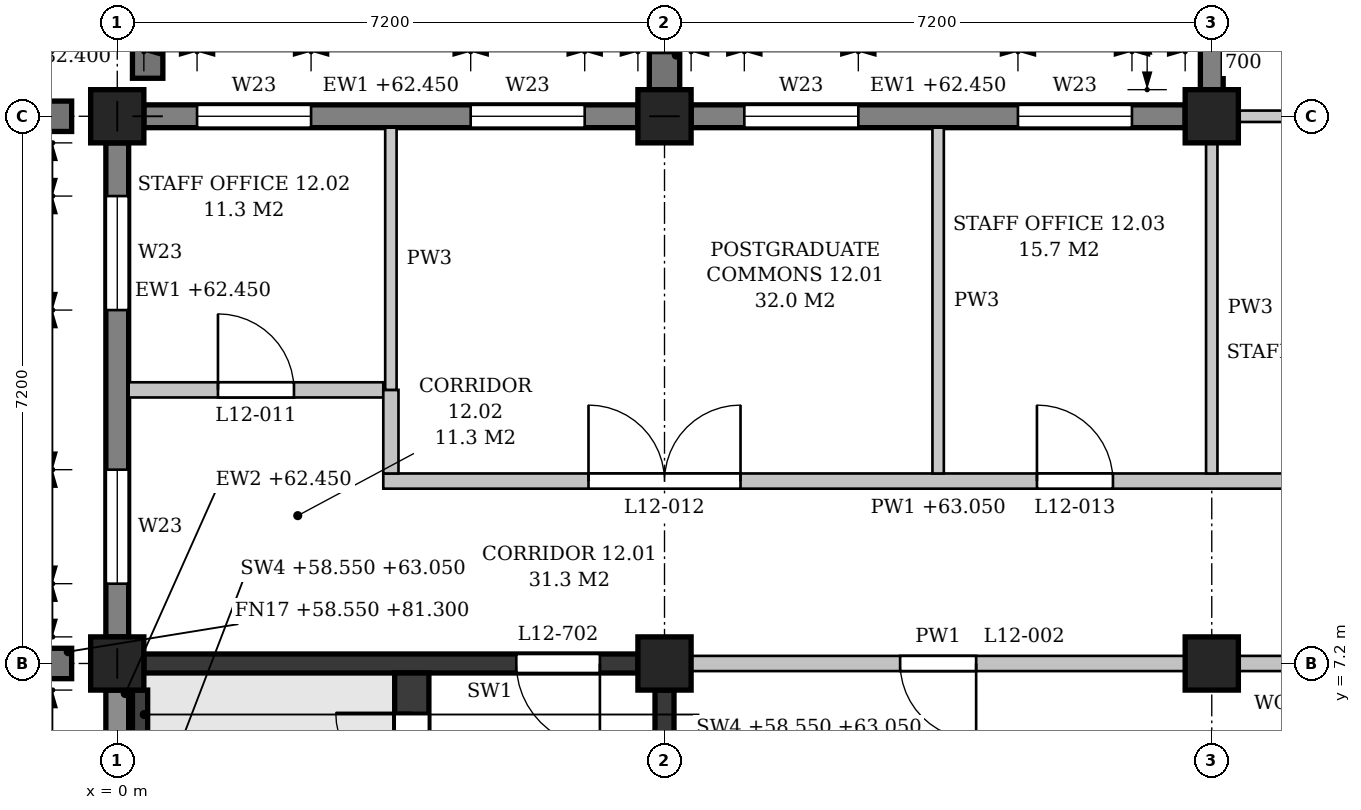
"""IFC4 building model, lengths in metres.
Left out: names, types, materials, properties, quantities, classifications, styles, units other than length and angle.
Written with IfcOpenShell. Run it as: python <this file> out.ifc"""

import sys

from ifc_helpers import new_model, si_unit, direction, frame, frame_2d, origin, origin_2d, place, context, subcontext, project, spatial, polyline, rectangle, outline, extrude, element, fill, save


model = new_model("IFC4")
c1 = context("Model", 3, precision=1e-05, world=origin(), true_north=direction((0.0, 1.0)))
c2 = subcontext(c1, "Body", "Model", "MODEL_VIEW")
j1 = project(units=[si_unit("LENGTHUNIT", "METRE"), si_unit("PLANEANGLEUNIT", "RADIAN")], contexts=[c1])
p1 = place(None, origin())
s1 = spatial("IfcSite", under=j1, at=p1, CompositionType="ELEMENT")
p2 = place(p1, origin())
s2 = spatial("IfcBuilding", under=s1, at=p2, CompositionType="ELEMENT")
p3 = place(p2, frame((0.0, 0.0, 58.8)))
s3 = spatial("IfcBuildingStorey", under=s2, at=p3, CompositionType="ELEMENT", Elevation=58.8)
for number, where, z_axis, x_axis in (
    (1, (0.0, 7.2, 0.0), (0.0, 0.0, 1.0), (1.0, 0.0, 0.0)),
    (2, (0.0, 14.4, 0.0), (0.0, 0.0, 1.0), (1.0, 0.0, 0.0)),
    (3, (7.2, 7.2, 0.0), (0.0, 0.0, 1.0), (1.0, 0.0, 0.0)),
    (4, (7.2, 14.4, 0.0), (0.0, 0.0, 1.0), (1.0, 0.0, 0.0)),
    (5, (14.4, 7.2, 0.0), (0.0, 0.0, 1.0), (1.0, 0.0, 0.0)),
    (6, (14.4, 14.4, 0.0), (0.0, 0.0, 1.0), (1.0, 0.0, 0.0)),
):
    element("IfcColumn", number, at=place(p3, frame(where, z_axis=z_axis, x_axis=x_axis)), inside=s3, PredefinedType="COLUMN", context=c2, shape_type="SweptSolid", body=[
        extrude(rectangle(XDim=0.7, YDim=0.7, at=origin_2d()), origin(), (0.0, 0.0, 1.0), 4.5),
    ])
p4 = place(p3, frame((0.0, 0.35, 0.0), z_axis=(0.0, 0.0, 1.0), x_axis=(0.0, 1.0, 0.0)))
e7 = element("IfcWall", 7, at=p4, inside=s3, PredefinedType="STANDARD", context=c2, shape_type="SweptSolid", body=[
    extrude(rectangle(XDim=6.5, YDim=0.3, at=frame_2d((3.25, 0.0))), origin(), (0.0, 0.0, 1.0), 3.65),
])
p5 = place(p4, frame((1.0, 0.0, 0.9)))
e8 = element("IfcOpeningElement", 8, at=p5, cuts=e7, PredefinedType="OPENING", context=c2, shape_type="SweptSolid", body=[
    extrude(outline(polyline([(0.0, 0.0), (0.9, 0.0), (0.9, 2.25), (0.45, 2.7), (0.0, 2.25), (0.0, 0.0)])), frame((0.0, 0.16, 0.0), z_axis=(0.0, -1.0, 0.0), x_axis=(1.0, 0.0, 0.0)), (0.0, 0.0, 1.0), 0.32),
])
p6 = place(p4, frame((4.6, 0.0, 0.9)))
e9 = element("IfcOpeningElement", 9, at=p6, cuts=e7, PredefinedType="OPENING", context=c2, shape_type="SweptSolid", body=[
    extrude(outline(polyline([(0.0, 0.0), (0.9, 0.0), (0.9, 2.25), (0.45, 2.7), (0.0, 2.25), (0.0, 0.0)])), frame((0.0, 0.16, 0.0), z_axis=(0.0, -1.0, 0.0), x_axis=(1.0, 0.0, 0.0)), (0.0, 0.0, 1.0), 0.32),
])
p7 = place(p3, frame((0.0, 7.55, 0.0), z_axis=(0.0, 0.0, 1.0), x_axis=(0.0, 1.0, 0.0)))
e10 = element("IfcWall", 10, at=p7, inside=s3, PredefinedType="STANDARD", context=c2, shape_type="SweptSolid", body=[
    extrude(rectangle(XDim=6.5, YDim=0.3, at=frame_2d((3.25, 0.0))), origin(), (0.0, 0.0, 1.0), 3.65),
])
p8 = place(p7, frame((0.7, 0.0, 0.9)))
e11 = element("IfcOpeningElement", 11, at=p8, cuts=e10, PredefinedType="OPENING", context=c2, shape_type="SweptSolid", body=[
    extrude(outline(polyline([(0.0, 0.0), (1.5, 0.0), (1.5, 1.95), (0.75, 2.7), (0.0, 1.95), (0.0, 0.0)])), frame((0.0, 0.16, 0.0), z_axis=(0.0, -1.0, 0.0), x_axis=(1.0, 0.0, 0.0)), (0.0, 0.0, 1.0), 0.32),
])
p9 = place(p7, frame((4.3, 0.0, 0.9)))
e12 = element("IfcOpeningElement", 12, at=p9, cuts=e10, PredefinedType="OPENING", context=c2, shape_type="SweptSolid", body=[
    extrude(outline(polyline([(0.0, 0.0), (1.5, 0.0), (1.5, 1.95), (0.75, 2.7), (0.0, 1.95), (0.0, 0.0)])), frame((0.0, 0.16, 0.0), z_axis=(0.0, -1.0, 0.0), x_axis=(1.0, 0.0, 0.0)), (0.0, 0.0, 1.0), 0.32),
])
p10 = place(p3, frame((14.05, 14.4, 0.0), z_axis=(0.0, 0.0, 1.0), x_axis=(-1.0, 0.0, 0.0)))
e13 = element("IfcWall", 13, at=p10, inside=s3, PredefinedType="STANDARD", context=c2, shape_type="SweptSolid", body=[
    extrude(rectangle(XDim=6.5, YDim=0.3, at=frame_2d((3.25, 0.0))), origin(), (0.0, 0.0, 1.0), 3.65),
])
p11 = place(p10, frame((0.7, 0.0, 0.9)))
e14 = element("IfcOpeningElement", 14, at=p11, cuts=e13, PredefinedType="OPENING", context=c2, shape_type="SweptSolid", body=[
    extrude(outline(polyline([(0.0, 0.0), (1.5, 0.0), (1.5, 1.95), (0.75, 2.7), (0.0, 1.95), (0.0, 0.0)])), frame((0.0, 0.16, 0.0), z_axis=(0.0, -1.0, 0.0), x_axis=(1.0, 0.0, 0.0)), (0.0, 0.0, 1.0), 0.32),
])
p12 = place(p10, frame((4.3, 0.0, 0.9)))
e15 = element("IfcOpeningElement", 15, at=p12, cuts=e13, PredefinedType="OPENING", context=c2, shape_type="SweptSolid", body=[
    extrude(outline(polyline([(0.0, 0.0), (1.5, 0.0), (1.5, 1.95), (0.75, 2.7), (0.0, 1.95), (0.0, 0.0)])), frame((0.0, 0.16, 0.0), z_axis=(0.0, -1.0, 0.0), x_axis=(1.0, 0.0, 0.0)), (0.0, 0.0, 1.0), 0.32),
])
p13 = place(p3, frame((6.85, 14.4, 0.0), z_axis=(0.0, 0.0, 1.0), x_axis=(-1.0, 0.0, 0.0)))
e16 = element("IfcWall", 16, at=p13, inside=s3, PredefinedType="STANDARD", context=c2, shape_type="SweptSolid", body=[
    extrude(rectangle(XDim=6.5, YDim=0.3, at=frame_2d((3.25, 0.0))), origin(), (0.0, 0.0, 1.0), 3.65),
])
p14 = place(p13, frame((0.7, 0.0, 0.9)))
e17 = element("IfcOpeningElement", 17, at=p14, cuts=e16, PredefinedType="OPENING", context=c2, shape_type="SweptSolid", body=[
    extrude(outline(polyline([(0.0, 0.0), (1.5, 0.0), (1.5, 1.95), (0.75, 2.7), (0.0, 1.95), (0.0, 0.0)])), frame((0.0, 0.16, 0.0), z_axis=(0.0, -1.0, 0.0), x_axis=(1.0, 0.0, 0.0)), (0.0, 0.0, 1.0), 0.32),
])
p15 = place(p13, frame((4.3, 0.0, 0.9)))
e18 = element("IfcOpeningElement", 18, at=p15, cuts=e16, PredefinedType="OPENING", context=c2, shape_type="SweptSolid", body=[
    extrude(outline(polyline([(0.0, 0.0), (1.5, 0.0), (1.5, 1.95), (0.75, 2.7), (0.0, 1.95), (0.0, 0.0)])), frame((0.0, 0.16, 0.0), z_axis=(0.0, -1.0, 0.0), x_axis=(1.0, 0.0, 0.0)), (0.0, 0.0, 1.0), 0.32),
])
p16 = place(p3, frame((14.4, 14.75, 0.0), z_axis=(0.0, 0.0, 1.0), x_axis=(0.0, 1.0, 0.0)))
e19 = element("IfcWall", 19, at=p16, inside=s3, PredefinedType="STANDARD", context=c2, shape_type="SweptSolid", body=[
    extrude(rectangle(XDim=6.5, YDim=0.3, at=frame_2d((3.25, 0.0))), origin(), (0.0, 0.0, 1.0), 3.65),
])
p17 = place(p16, frame((0.7, 0.0, 0.9)))
e20 = element("IfcOpeningElement", 20, at=p17, cuts=e19, PredefinedType="OPENING", context=c2, shape_type="SweptSolid", body=[
    extrude(outline(polyline([(0.0, 0.0), (1.5, 0.0), (1.5, 1.95), (0.75, 2.7), (0.0, 1.95), (0.0, 0.0)])), frame((0.0, 0.16, 0.0), z_axis=(0.0, -1.0, 0.0), x_axis=(1.0, 0.0, 0.0)), (0.0, 0.0, 1.0), 0.32),
])
p18 = place(p16, frame((4.3, 0.0, 0.9)))
e21 = element("IfcOpeningElement", 21, at=p18, cuts=e19, PredefinedType="OPENING", context=c2, shape_type="SweptSolid", body=[
    extrude(outline(polyline([(0.0, 0.0), (1.5, 0.0), (1.5, 1.95), (0.75, 2.7), (0.0, 1.95), (0.0, 0.0)])), frame((0.0, 0.16, 0.0), z_axis=(0.0, -1.0, 0.0), x_axis=(1.0, 0.0, 0.0)), (0.0, 0.0, 1.0), 0.32),
])
p19 = place(p3, frame((-0.6, 7.2, -0.25), z_axis=(0.0, 0.0, 1.0), x_axis=(-1.0, 0.0, 0.0)))
e22 = element("IfcWall", 22, at=p19, inside=s3, PredefinedType="POLYGONAL", context=c2, shape_type="SweptSolid", body=[
    extrude(outline(polyline([(0.5, 0.0), (0.5, 22.225), (0.15, 22.75), (0.0, 22.75), (0.0, 0.0), (0.5, 0.0)])), frame((0.0, 0.2, 0.0), z_axis=(0.0, -1.0, 0.0), x_axis=(1.0, 0.0, 0.0)), (0.0, 0.0, 1.0), 0.4),
])
for number, where, z_axis, x_axis in (
    (23, (-0.6, 14.4, -0.25), (0.0, 0.0, 1.0), (-1.0, 0.0, 0.0)),
    (24, (0.4, 14.9, -0.25), (0.0, 0.0, 1.0), (0.0, 1.0, 0.0)),
):
    element("IfcWall", number, at=place(p3, frame(where, z_axis=z_axis, x_axis=x_axis)), inside=s3, PredefinedType="POLYGONAL", context=c2, shape_type="SweptSolid", body=[
        extrude(outline(polyline([(0.5, 0.0), (0.5, 23.85), (0.0, 23.85), (0.0, 0.0), (0.5, 0.0)])), frame((0.0, 0.2, 0.0), z_axis=(0.0, -1.0, 0.0), x_axis=(1.0, 0.0, 0.0)), (0.0, 0.0, 1.0), 0.4),
    ])
p20 = place(p3, frame((7.2, 14.75, -0.25), z_axis=(0.0, 0.0, 1.0), x_axis=(0.0, 1.0, 0.0)))
e25 = element("IfcWall", 25, at=p20, inside=s3, PredefinedType="POLYGONAL", context=c2, shape_type="SweptSolid", body=[
    extrude(outline(polyline([(0.5, 0.0), (0.5, 22.225), (0.15, 22.75), (0.0, 22.75), (0.0, 0.0), (0.5, 0.0)])), frame((0.0, 0.2, 0.0), z_axis=(0.0, -1.0, 0.0), x_axis=(1.0, 0.0, 0.0)), (0.0, 0.0, 1.0), 0.4),
])
p21 = place(p3, frame((0.35, 7.2, 0.0), z_axis=(0.0, 0.0, 1.0), x_axis=(1.0, 0.0, 0.0)))
e26 = element("IfcWall", 26, at=p21, inside=s3, PredefinedType="SHEAR", context=c2, shape_type="SweptSolid", body=[
    extrude(rectangle(XDim=6.5, YDim=0.25, at=frame_2d((3.25, 0.0))), origin(), (0.0, 0.0, 1.0), 3.6),
])
p22 = place(p21, frame((4.9, 0.0, 0.0)))
e27 = element("IfcOpeningElement", 27, at=p22, cuts=e26, PredefinedType="OPENING", context=c2, shape_type="SweptSolid", body=[
    extrude(rectangle(XDim=1.1, YDim=2.1, at=frame_2d((0.55, 1.05))), frame((0.0, 0.135, 0.0), z_axis=(0.0, -1.0, 0.0), x_axis=(1.0, 0.0, 0.0)), (0.0, 0.0, 1.0), 0.27),
])
p23 = place(p3, frame((7.2, 0.35, 0.0), z_axis=(0.0, 0.0, 1.0), x_axis=(0.0, 1.0, 0.0)))
e28 = element("IfcWall", 28, at=p23, inside=s3, PredefinedType="SHEAR", context=c2, shape_type="SweptSolid", body=[
    extrude(rectangle(XDim=6.5, YDim=0.25, at=frame_2d((3.25, 0.0))), origin(), (0.0, 0.0, 1.0), 3.6),
])
p24 = place(p3, frame((0.3, 5.85, -0.25), z_axis=(0.0, 0.0, 1.0), x_axis=(0.0, 1.0, 0.0)))
e29 = element("IfcWall", 29, at=p24, inside=s3, PredefinedType="SHEAR", context=c2, shape_type="SweptSolid", body=[
    extrude(rectangle(XDim=1.0, YDim=0.2, at=frame_2d((0.5, 0.0))), origin(), (0.0, 0.0, 1.0), 4.5),
])
p25 = place(p3, frame((3.875, 0.15, 0.0), z_axis=(0.0, 0.0, 1.0), x_axis=(0.0, 1.0, 0.0)))
e30 = element("IfcWall", 30, at=p25, inside=s3, PredefinedType="SHEAR", context=c2, shape_type="SweptSolid", body=[
    extrude(rectangle(XDim=6.925, YDim=0.45, at=frame_2d((3.462, 0.0))), origin(), (0.0, 0.0, 1.0), 4.25),
])
p26 = place(p25, frame((5.4, 0.0, 0.0)))
e31 = element("IfcOpeningElement", 31, at=p26, cuts=e30, PredefinedType="OPENING", context=c2, shape_type="SweptSolid", body=[
    extrude(rectangle(XDim=1.0, YDim=2.1, at=frame_2d((0.5, 1.05))), frame((0.0, 0.235, 0.0), z_axis=(0.0, -1.0, 0.0), x_axis=(1.0, 0.0, 0.0)), (0.0, 0.0, 1.0), 0.47),
])
p27 = place(p3, frame((7.55, 7.2, 0.0), z_axis=(0.0, 0.0, 1.0), x_axis=(1.0, 0.0, 0.0)))
e32 = element("IfcWall", 32, at=p27, inside=s3, PredefinedType="PARTITIONING", context=c2, shape_type="SweptSolid", body=[
    extrude(rectangle(XDim=6.5, YDim=0.2, at=frame_2d((3.25, 0.0))), origin(), (0.0, 0.0, 1.0), 3.6),
])
p28 = place(p27, frame((2.75, 0.0, 0.0)))
e33 = element("IfcOpeningElement", 33, at=p28, cuts=e32, PredefinedType="OPENING", context=c2, shape_type="SweptSolid", body=[
    extrude(rectangle(XDim=1.0, YDim=2.1, at=frame_2d((0.5, 1.05))), frame((0.0, 0.11, 0.0), z_axis=(0.0, -1.0, 0.0), x_axis=(1.0, 0.0, 0.0)), (0.0, 0.0, 1.0), 0.22),
])
p29 = place(p3, frame((14.75, 7.2, 0.0), z_axis=(0.0, 0.0, 1.0), x_axis=(1.0, 0.0, 0.0)))
e34 = element("IfcWall", 34, at=p29, inside=s3, PredefinedType="PARTITIONING", context=c2, shape_type="SweptSolid", body=[
    extrude(rectangle(XDim=6.5, YDim=0.2, at=frame_2d((3.25, 0.0))), origin(), (0.0, 0.0, 1.0), 3.6),
])
p30 = place(p29, frame((4.375, 0.0, 0.0)))
e35 = element("IfcOpeningElement", 35, at=p30, cuts=e34, PredefinedType="OPENING", context=c2, shape_type="SweptSolid", body=[
    extrude(rectangle(XDim=1.0, YDim=2.1, at=frame_2d((0.5, 1.05))), frame((0.0, 0.11, 0.0), z_axis=(0.0, -1.0, 0.0), x_axis=(1.0, 0.0, 0.0)), (0.0, 0.0, 1.0), 0.22),
])
p31 = place(p3, frame((3.5, 9.6, 0.0), z_axis=(0.0, 0.0, 1.0), x_axis=(1.0, 0.0, 0.0)))
e36 = element("IfcWall", 36, at=p31, inside=s3, PredefinedType="PARTITIONING", context=c2, shape_type="SweptSolid", body=[
    extrude(outline(polyline([(0.0, 0.0), (14.6, 0.0), (14.6, 4.25), (11.1, 4.25), (11.1, 3.6), (10.7, 3.6), (10.7, 4.25), (3.9, 4.25), (3.9, 3.6), (3.5, 3.6), (3.5, 4.25), (0.0, 4.25), (0.0, 0.0)])), frame((0.0, 0.1, 0.0), z_axis=(0.0, -1.0, 0.0), x_axis=(1.0, 0.0, 0.0)), (0.0, 0.0, 1.0), 0.2),
])
p32 = place(p31, frame((2.7, 0.0, 0.0)))
e37 = element("IfcOpeningElement", 37, at=p32, cuts=e36, PredefinedType="OPENING", context=c2, shape_type="SweptSolid", body=[
    extrude(rectangle(XDim=2.0, YDim=2.1, at=frame_2d((1.0, 1.05))), frame((0.0, 0.11, 0.0), z_axis=(0.0, -1.0, 0.0), x_axis=(1.0, 0.0, 0.0)), (0.0, 0.0, 1.0), 0.22),
])
p33 = place(p31, frame((8.6, 0.0, 0.0)))
e38 = element("IfcOpeningElement", 38, at=p33, cuts=e36, PredefinedType="OPENING", context=c2, shape_type="SweptSolid", body=[
    extrude(rectangle(XDim=1.0, YDim=2.1, at=frame_2d((0.5, 1.05))), frame((0.0, 0.11, 0.0), z_axis=(0.0, -1.0, 0.0), x_axis=(1.0, 0.0, 0.0)), (0.0, 0.0, 1.0), 0.22),
])
p34 = place(p3, frame((0.15, 10.8, 0.0), z_axis=(0.0, 0.0, 1.0), x_axis=(1.0, 0.0, 0.0)))
e39 = element("IfcWall", 39, at=p34, inside=s3, PredefinedType="PARTITIONING", context=c2, shape_type="SweptSolid", body=[
    extrude(outline(polyline([(0.0, 0.0), (3.35, 0.0), (3.35, 4.25), (0.05, 4.25), (0.05, 3.65), (0.0, 3.65), (0.0, 0.0)])), frame((0.0, 0.1, 0.0), z_axis=(0.0, -1.0, 0.0), x_axis=(1.0, 0.0, 0.0)), (0.0, 0.0, 1.0), 0.2),
])
p35 = place(p34, frame((1.175, 0.0, 0.0)))
e40 = element("IfcOpeningElement", 40, at=p35, cuts=e39, PredefinedType="OPENING", context=c2, shape_type="SweptSolid", body=[
    extrude(rectangle(XDim=1.0, YDim=2.1, at=frame_2d((0.5, 1.05))), frame((0.0, 0.11, 0.0), z_axis=(0.0, -1.0, 0.0), x_axis=(1.0, 0.0, 0.0)), (0.0, 0.0, 1.0), 0.22),
])
p36 = place(p3, frame((14.75, 14.4, 0.0), z_axis=(0.0, 0.0, 1.0), x_axis=(1.0, 0.0, 0.0)))
e41 = element("IfcWall", 41, at=p36, inside=s3, PredefinedType="PARTITIONING", context=c2, shape_type="SweptSolid", body=[
    extrude(rectangle(XDim=3.15, YDim=0.15, at=frame_2d((1.575, 0.0))), origin(), (0.0, 0.0, 1.0), 3.6),
])
p37 = place(p3, frame((3.6, 9.7, 0.0), z_axis=(0.0, 0.0, 1.0), x_axis=(0.0, 1.0, 0.0)))
e42 = element("IfcWall", 42, at=p37, inside=s3, PredefinedType="PARTITIONING", context=c2, shape_type="SweptSolid", body=[
    extrude(rectangle(XDim=1.1, YDim=0.2, at=frame_2d((0.55, 0.0))), origin(), (0.0, 0.0, 1.0), 4.25),
])
p38 = place(p3, frame((3.6, 10.8, 0.0), z_axis=(0.0, 0.0, 1.0), x_axis=(0.0, 1.0, 0.0)))
e43 = element("IfcWall", 43, at=p38, inside=s3, PredefinedType="PARTITIONING", context=c2, shape_type="SweptSolid", body=[
    extrude(rectangle(XDim=3.45, YDim=0.15, at=frame_2d((1.725, 0.0))), origin(), (0.0, 0.0, 1.0), 3.6),
])
p39 = place(p3, frame((10.8, 9.7, 0.0), z_axis=(0.0, 0.0, 1.0), x_axis=(0.0, 1.0, 0.0)))
e44 = element("IfcWall", 44, at=p39, inside=s3, PredefinedType="PARTITIONING", context=c2, shape_type="SweptSolid", body=[
    extrude(rectangle(XDim=4.55, YDim=0.15, at=frame_2d((2.275, 0.0))), origin(), (0.0, 0.0, 1.0), 3.6),
])
p40 = place(p3, frame((14.4, 9.7, 0.0), z_axis=(0.0, 0.0, 1.0), x_axis=(0.0, 1.0, 0.0)))
e45 = element("IfcWall", 45, at=p40, inside=s3, PredefinedType="PARTITIONING", context=c2, shape_type="SweptSolid", body=[
    extrude(rectangle(XDim=4.35, YDim=0.15, at=frame_2d((2.175, 0.0))), origin(), (0.0, 0.0, 1.0), 3.6),
])
p41 = place(p11, origin())
e46 = element("IfcWindow", 46, at=p41, inside=s3, PartitioningType="SINGLE_PANEL", PredefinedType="WINDOW", context=c2, shape_type="SweptSolid", body=[
    extrude(outline(polyline([(0.0, 0.0), (1.5, 0.0), (1.5, 1.95), (0.75, 2.7), (0.0, 1.95), (0.0, 0.0)])), frame((0.0, 0.03, 0.0), z_axis=(0.0, -1.0, 0.0), x_axis=(1.0, 0.0, 0.0)), (0.0, 0.0, 1.0), 0.06),
])
fill(e14, e46)
p42 = place(p12, origin())
e47 = element("IfcWindow", 47, at=p42, inside=s3, PartitioningType="SINGLE_PANEL", PredefinedType="WINDOW", context=c2, shape_type="SweptSolid", body=[
    extrude(outline(polyline([(0.0, 0.0), (1.5, 0.0), (1.5, 1.95), (0.75, 2.7), (0.0, 1.95), (0.0, 0.0)])), frame((0.0, 0.03, 0.0), z_axis=(0.0, -1.0, 0.0), x_axis=(1.0, 0.0, 0.0)), (0.0, 0.0, 1.0), 0.06),
])
fill(e15, e47)
p43 = place(p14, origin())
e48 = element("IfcWindow", 48, at=p43, inside=s3, PartitioningType="SINGLE_PANEL", PredefinedType="WINDOW", context=c2, shape_type="SweptSolid", body=[
    extrude(outline(polyline([(0.0, 0.0), (1.5, 0.0), (1.5, 1.95), (0.75, 2.7), (0.0, 1.95), (0.0, 0.0)])), frame((0.0, 0.03, 0.0), z_axis=(0.0, -1.0, 0.0), x_axis=(1.0, 0.0, 0.0)), (0.0, 0.0, 1.0), 0.06),
])
fill(e17, e48)
p44 = place(p15, origin())
e49 = element("IfcWindow", 49, at=p44, inside=s3, PartitioningType="SINGLE_PANEL", PredefinedType="WINDOW", context=c2, shape_type="SweptSolid", body=[
    extrude(outline(polyline([(0.0, 0.0), (1.5, 0.0), (1.5, 1.95), (0.75, 2.7), (0.0, 1.95), (0.0, 0.0)])), frame((0.0, 0.03, 0.0), z_axis=(0.0, -1.0, 0.0), x_axis=(1.0, 0.0, 0.0)), (0.0, 0.0, 1.0), 0.06),
])
fill(e18, e49)
p45 = place(p8, origin())
e50 = element("IfcWindow", 50, at=p45, inside=s3, PartitioningType="SINGLE_PANEL", PredefinedType="WINDOW", context=c2, shape_type="SweptSolid", body=[
    extrude(outline(polyline([(0.0, 0.0), (1.5, 0.0), (1.5, 1.95), (0.75, 2.7), (0.0, 1.95), (0.0, 0.0)])), frame((0.0, 0.03, 0.0), z_axis=(0.0, -1.0, 0.0), x_axis=(1.0, 0.0, 0.0)), (0.0, 0.0, 1.0), 0.06),
])
fill(e11, e50)
p46 = place(p9, origin())
e51 = element("IfcWindow", 51, at=p46, inside=s3, PartitioningType="SINGLE_PANEL", PredefinedType="WINDOW", context=c2, shape_type="SweptSolid", body=[
    extrude(outline(polyline([(0.0, 0.0), (1.5, 0.0), (1.5, 1.95), (0.75, 2.7), (0.0, 1.95), (0.0, 0.0)])), frame((0.0, 0.03, 0.0), z_axis=(0.0, -1.0, 0.0), x_axis=(1.0, 0.0, 0.0)), (0.0, 0.0, 1.0), 0.06),
])
fill(e12, e51)
p47 = place(p26, origin())
e52 = element("IfcDoor", 52, at=p47, inside=s3, OperationType="SINGLE_SWING_RIGHT", PredefinedType="DOOR", context=c2, shape_type="SweptSolid", body=[
    extrude(rectangle(XDim=1.0, YDim=2.1, at=frame_2d((0.5, 1.05))), frame((0.0, 0.025, 0.0), z_axis=(0.0, -1.0, 0.0), x_axis=(1.0, 0.0, 0.0)), (0.0, 0.0, 1.0), 0.05),
])
fill(e31, e52)
p48 = place(p22, frame((1.1, 0.0, 0.0), z_axis=(0.0, 0.0, 1.0), x_axis=(-1.0, 0.0, 0.0)))
e53 = element("IfcDoor", 53, at=p48, inside=s3, OperationType="SINGLE_SWING_LEFT", PredefinedType="DOOR", context=c2, shape_type="SweptSolid", body=[
    extrude(rectangle(XDim=1.1, YDim=2.1, at=frame_2d((0.55, 1.05))), frame((0.0, 0.025, 0.0), z_axis=(0.0, -1.0, 0.0), x_axis=(1.0, 0.0, 0.0)), (0.0, 0.0, 1.0), 0.05),
])
fill(e27, e53)
p49 = place(p28, frame((1.0, 0.0, 0.0), z_axis=(0.0, 0.0, 1.0), x_axis=(-1.0, 0.0, 0.0)))
e54 = element("IfcDoor", 54, at=p49, inside=s3, OperationType="SINGLE_SWING_LEFT", PredefinedType="DOOR", context=c2, shape_type="SweptSolid", body=[
    extrude(rectangle(XDim=1.0, YDim=2.1, at=frame_2d((0.5, 1.05))), frame((0.0, 0.025, 0.0), z_axis=(0.0, -1.0, 0.0), x_axis=(1.0, 0.0, 0.0)), (0.0, 0.0, 1.0), 0.05),
])
fill(e33, e54)
p50 = place(p35, origin())
e55 = element("IfcDoor", 55, at=p50, inside=s3, OperationType="SINGLE_SWING_LEFT", PredefinedType="DOOR", context=c2, shape_type="SweptSolid", body=[
    extrude(rectangle(XDim=1.0, YDim=2.1, at=frame_2d((0.5, 1.05))), frame((0.0, 0.025, 0.0), z_axis=(0.0, -1.0, 0.0), x_axis=(1.0, 0.0, 0.0)), (0.0, 0.0, 1.0), 0.05),
])
fill(e40, e55)
p51 = place(p32, origin())
e56 = element("IfcDoor", 56, at=p51, inside=s3, OperationType="DOUBLE_DOOR_SINGLE_SWING", PredefinedType="DOOR", context=c2, shape_type="SweptSolid", body=[
    extrude(rectangle(XDim=2.0, YDim=2.1, at=frame_2d((1.0, 1.05))), frame((0.0, 0.025, 0.0), z_axis=(0.0, -1.0, 0.0), x_axis=(1.0, 0.0, 0.0)), (0.0, 0.0, 1.0), 0.05),
])
fill(e37, e56)
p52 = place(p33, origin())
e57 = element("IfcDoor", 57, at=p52, inside=s3, OperationType="SINGLE_SWING_LEFT", PredefinedType="DOOR", context=c2, shape_type="SweptSolid", body=[
    extrude(rectangle(XDim=1.0, YDim=2.1, at=frame_2d((0.5, 1.05))), frame((0.0, 0.025, 0.0), z_axis=(0.0, -1.0, 0.0), x_axis=(1.0, 0.0, 0.0)), (0.0, 0.0, 1.0), 0.05),
])
fill(e38, e57)
save(model, sys.argv[1])
